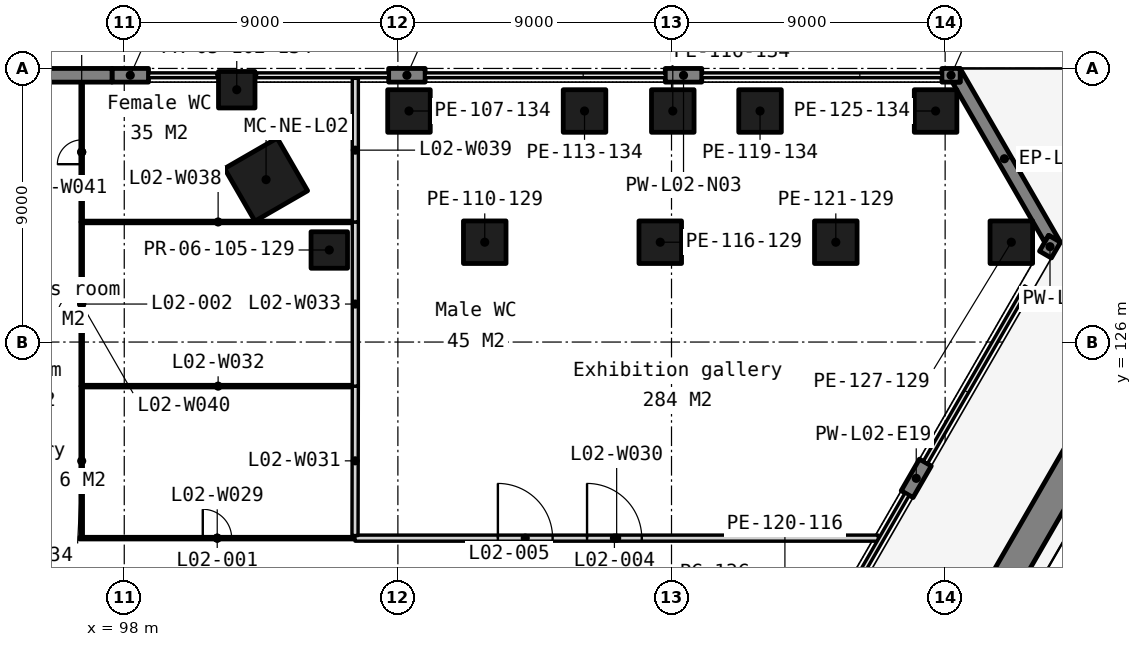
"""IFC4 building model, lengths in metres.
Left out: names, types, materials, properties, quantities, classifications, styles, units other than length and angle.
Written with IfcOpenShell. Run it as: python <this file> out.ifc"""

import sys

from ifc_helpers import new_model, si_unit, direction, frame, frame_2d, origin, origin_2d, place, context, subcontext, project, spatial, polyline, rectangle, outline, extrude, element, fill, save


model = new_model("IFC4")
c1 = context("Model", 3, precision=1e-05, world=origin(), true_north=direction((0.0, 1.0)))
c2 = subcontext(c1, "Body", "Model", "MODEL_VIEW")
j1 = project(units=[si_unit("LENGTHUNIT", "METRE"), si_unit("PLANEANGLEUNIT", "RADIAN")], contexts=[c1])
p1 = place(None, origin())
s1 = spatial("IfcSite", under=j1, at=p1, CompositionType="ELEMENT")
p2 = place(p1, origin())
s2 = spatial("IfcBuilding", under=s1, at=p2, CompositionType="ELEMENT")
p3 = place(p2, frame((0.0, 0.0, 13.5)))
s3 = spatial("IfcBuildingStorey", under=s2, at=p3, CompositionType="ELEMENT", Elevation=13.5)
for number, where, z_axis, x_axis in (
    (1, (107.365, 133.6, 0.0), (0.0, 0.0, 1.0), (1.0, 0.0, 0.0)),
    (2, (109.857, 129.284, 0.0), (0.0, 0.0, 1.0), (1.0, 0.0, 0.0)),
    (3, (113.139, 133.6, 0.0), (0.0, 0.0, 1.0), (1.0, 0.0, 0.0)),
    (4, (115.63, 129.284, 0.0), (0.0, 0.0, 1.0), (1.0, 0.0, 0.0)),
    (5, (116.042, 133.6, 0.0), (0.0, 0.0, 1.0), (1.0, 0.0, 0.0)),
    (6, (118.912, 133.6, 0.0), (0.0, 0.0, 1.0), (1.0, 0.0, 0.0)),
    (7, (121.404, 129.284, 0.0), (0.0, 0.0, 1.0), (1.0, 0.0, 0.0)),
    (8, (124.686, 133.6, 0.0), (0.0, 0.0, 1.0), (1.0, 0.0, 0.0)),
    (9, (127.177, 129.284, 0.0), (0.0, 0.0, 1.0), (1.0, 0.0, 0.0)),
):
    element("IfcColumn", number, at=place(p3, frame(where, z_axis=z_axis, x_axis=x_axis)), inside=s3, PredefinedType="COLUMN", context=c2, shape_type="SweptSolid", body=[
        extrude(rectangle(XDim=1.4, YDim=1.4, at=origin_2d()), origin(), (0.0, 0.0, 1.0), 6.0),
    ])
for number, where, z_axis, x_axis in (
    (10, (101.7, 134.3, 0.0), (0.0, 0.0, 1.0), (1.0, 0.0, 0.0)),
    (11, (104.744, 129.028, 0.0), (0.0, 0.0, 1.0), (1.0, 0.0, 0.0)),
):
    element("IfcColumn", number, at=place(p3, frame(where, z_axis=z_axis, x_axis=x_axis)), inside=s3, PredefinedType="COLUMN", context=c2, shape_type="SweptSolid", body=[
        extrude(rectangle(XDim=1.2, YDim=1.2, at=origin_2d()), origin(), (0.0, 0.0, 1.0), 6.0),
    ])
p4 = place(p3, frame((102.664, 131.342, 0.0), z_axis=(0.0, 0.0, 1.0), x_axis=(-0.5, 0.866025403784, 0.0)))
e12 = element("IfcColumn", 12, at=p4, inside=s3, PredefinedType="COLUMN", context=c2, shape_type="SweptSolid", body=[
    extrude(rectangle(XDim=2.0, YDim=2.0, at=origin_2d()), origin(), (0.0, 0.0, 1.0), 6.0),
])
p5 = place(p3, frame((0.0, 0.0, -0.3)))
e13 = element("IfcWall", 13, at=p5, inside=s3, PredefinedType="SOLIDWALL", context=c2, shape_type="SweptSolid", body=[
    extrude(outline(polyline([(128.794, 129.284), (128.404, 129.509), (128.274, 129.284), (125.234, 134.55), (125.494, 134.55), (125.494, 135.0), (128.794, 129.284)])), origin(), (0.0, 0.0, 1.0), 5.363),
])
p6 = place(p3, frame((125.494, 134.775, -0.3), z_axis=(0.0, 0.0, 1.0), x_axis=(-1.0, 0.0, 0.0)))
e14 = element("IfcWall", 14, at=p6, inside=s3, PredefinedType="SOLIDWALL", context=c2, shape_type="SweptSolid", body=[
    extrude(rectangle(XDim=0.6, YDim=0.45, at=frame_2d((0.3, 0.0))), origin(), (0.0, 0.0, 1.0), 5.363),
])
p7 = place(p3, frame((116.995, 134.775, -0.3), z_axis=(0.0, 0.0, 1.0), x_axis=(-1.0, 0.0, 0.0)))
e15 = element("IfcWall", 15, at=p7, inside=s3, PredefinedType="SOLIDWALL", context=c2, shape_type="SweptSolid", body=[
    extrude(rectangle(XDim=1.2, YDim=0.45, at=frame_2d((0.6, 0.0))), origin(), (0.0, 0.0, 1.0), 5.363),
])
p8 = place(p3, frame((107.896, 134.775, -0.3), z_axis=(0.0, 0.0, 1.0), x_axis=(-1.0, 0.0, 0.0)))
e16 = element("IfcWall", 16, at=p8, inside=s3, PredefinedType="SOLIDWALL", context=c2, shape_type="SweptSolid", body=[
    extrude(rectangle(XDim=1.2, YDim=0.45, at=frame_2d((0.6, 0.0))), origin(), (0.0, 0.0, 1.0), 5.363),
])
p9 = place(p3, frame((98.798, 134.775, -0.3), z_axis=(0.0, 0.0, 1.0), x_axis=(-1.0, 0.0, 0.0)))
e17 = element("IfcWall", 17, at=p9, inside=s3, PredefinedType="SOLIDWALL", context=c2, shape_type="SweptSolid", body=[
    extrude(rectangle(XDim=1.2, YDim=0.45, at=frame_2d((0.6, 0.0))), origin(), (0.0, 0.0, 1.0), 5.363),
])
p10 = place(p3, frame((97.598, 134.775, -0.3), z_axis=(0.0, 0.0, 1.0), x_axis=(-1.0, 0.0, 0.0)))
e18 = element("IfcWall", 18, at=p10, inside=s3, PredefinedType="SOLIDWALL", context=c2, shape_type="SweptSolid", body=[
    extrude(rectangle(XDim=7.899, YDim=0.45, at=frame_2d((3.949, 0.0))), origin(), (0.0, 0.0, 1.0), 5.363),
])
p11 = place(p3, frame((123.75, 120.997, -0.3), z_axis=(0.0, 0.0, 1.0), x_axis=(0.500033551112, 0.866006032174, 0.0)))
e19 = element("IfcWall", 19, at=p11, inside=s3, PredefinedType="SOLIDWALL", context=c2, shape_type="SweptSolid", body=[
    extrude(rectangle(XDim=1.2, YDim=0.45, at=frame_2d((0.6, 0.0))), origin(), (0.0, 0.0, 1.0), 5.363),
])
p12 = place(p3, frame((128.299, 128.877, -0.3), z_axis=(0.0, 0.0, 1.0), x_axis=(0.50012165622, 0.865955154139, 0.0)))
e20 = element("IfcWall", 20, at=p12, inside=s3, PredefinedType="SOLIDWALL", context=c2, shape_type="SweptSolid", body=[
    extrude(rectangle(XDim=0.6, YDim=0.45, at=frame_2d((0.3, 0.0))), origin(), (0.0, 0.0, 1.0), 5.363),
])
p13 = place(p3, frame((133.302, 129.091, 0.0), z_axis=(0.0, 0.0, 1.0), x_axis=(-0.500000924498, -0.866024870025, 0.0)))
e21 = element("IfcWall", 21, at=p13, inside=s3, PredefinedType="STANDARD", context=c2, shape_type="SweptSolid", body=[
    extrude(rectangle(XDim=100.935, YDim=1.0, at=frame_2d((50.467, 0.0))), origin(), (0.0, 0.0, 1.0), 0.6),
])
p14 = place(p3, frame((96.525, 119.55, 0.0), z_axis=(0.0, 0.0, 1.0), x_axis=(1.0, 0.0, 0.0)))
e22 = element("IfcWall", 22, at=p14, inside=s3, PredefinedType="PARTITIONING", context=c2, shape_type="SweptSolid", body=[
    extrude(rectangle(XDim=9.065, YDim=0.1, at=frame_2d((4.532, 0.0))), origin(), (0.0, 0.0, 1.0), 5.75),
])
p15 = place(p14, frame((4.057, 0.0, 0.0)))
e23 = element("IfcOpeningElement", 23, at=p15, cuts=e22, PredefinedType="OPENING", context=c2, shape_type="SweptSolid", body=[
    extrude(rectangle(XDim=0.95, YDim=2.1, at=frame_2d((0.475, 1.05))), frame((0.0, 0.06, 0.0), z_axis=(0.0, -1.0, 0.0), x_axis=(1.0, 0.0, 0.0)), (0.0, 0.0, 1.0), 0.12),
])
p16 = place(p3, frame((105.59, 119.55, 0.0), z_axis=(0.0, 0.0, 1.0), x_axis=(1.0, 0.0, 0.0)))
e24 = element("IfcWall", 24, at=p16, inside=s3, PredefinedType="PARTITIONING", context=c2, shape_type="SweptSolid", body=[
    extrude(rectangle(XDim=17.212, YDim=0.2, at=frame_2d((8.606, 0.0))), origin(), (0.0, 0.0, 1.0), 5.75),
])
p17 = place(p16, frame((7.632, 0.0, 0.0)))
e25 = element("IfcOpeningElement", 25, at=p17, cuts=e24, PredefinedType="OPENING", context=c2, shape_type="SweptSolid", body=[
    extrude(rectangle(XDim=1.8, YDim=2.1, at=frame_2d((0.9, 1.05))), frame((0.0, 0.11, 0.0), z_axis=(0.0, -1.0, 0.0), x_axis=(1.0, 0.0, 0.0)), (0.0, 0.0, 1.0), 0.22),
])
p18 = place(p16, frame((4.699, 0.0, 0.0)))
e26 = element("IfcOpeningElement", 26, at=p18, cuts=e24, PredefinedType="OPENING", context=c2, shape_type="SweptSolid", body=[
    extrude(rectangle(XDim=1.8, YDim=2.1, at=frame_2d((0.9, 1.05))), frame((0.0, 0.11, 0.0), z_axis=(0.0, -1.0, 0.0), x_axis=(1.0, 0.0, 0.0)), (0.0, 0.0, 1.0), 0.22),
])
p19 = place(p3, frame((105.59, 119.635, 0.0), z_axis=(0.0, 0.0, 1.0), x_axis=(0.002036554489, 0.999997926221, 0.0)))
e27 = element("IfcWall", 27, at=p19, inside=s3, PredefinedType="PARTITIONING", context=c2, shape_type="SweptSolid", body=[
    extrude(rectangle(XDim=4.915, YDim=0.2, at=frame_2d((2.458, 0.0))), origin(), (0.0, 0.0, 1.0), 5.75),
])
p20 = place(p3, frame((96.675, 124.55, 0.0), z_axis=(0.0, 0.0, 1.0), x_axis=(1.0, 0.0, 0.0)))
e28 = element("IfcWall", 28, at=p20, inside=s3, PredefinedType="PARTITIONING", context=c2, shape_type="SweptSolid", body=[
    extrude(rectangle(XDim=8.825, YDim=0.1, at=frame_2d((4.413, 0.0))), origin(), (0.0, 0.0, 1.0), 5.75),
])
p21 = place(p3, frame((105.6, 124.55, 0.0), z_axis=(0.0, 0.0, 1.0), x_axis=(0.0, 1.0, 0.0)))
e29 = element("IfcWall", 29, at=p21, inside=s3, PredefinedType="PARTITIONING", context=c2, shape_type="SweptSolid", body=[
    extrude(rectangle(XDim=5.4, YDim=0.2, at=frame_2d((2.7, 0.0))), origin(), (0.0, 0.0, 1.0), 5.75),
])
p22 = place(p3, frame((96.601, 119.625, 0.0), z_axis=(0.0, 0.0, 1.0), x_axis=(-9.9142418e-05, 0.999999995085, 0.0)))
e30 = element("IfcWall", 30, at=p22, inside=s3, PredefinedType="PARTITIONING", context=c2, shape_type="SweptSolid", body=[
    extrude(rectangle(XDim=4.925, YDim=0.1, at=frame_2d((2.462, 0.0))), origin(), (0.0, 0.0, 1.0), 5.75),
])
p23 = place(p3, frame((96.675, 129.95, 0.0), z_axis=(0.0, 0.0, 1.0), x_axis=(1.0, 0.0, 0.0)))
e31 = element("IfcWall", 31, at=p23, inside=s3, PredefinedType="PARTITIONING", context=c2, shape_type="SweptSolid", body=[
    extrude(rectangle(XDim=8.825, YDim=0.1, at=frame_2d((4.413, 0.0))), origin(), (0.0, 0.0, 1.0), 5.75),
])
p24 = place(p3, frame((105.6, 129.95, 0.0), z_axis=(0.0, 0.0, 1.0), x_axis=(0.0, 1.0, 0.0)))
e32 = element("IfcWall", 32, at=p24, inside=s3, PredefinedType="PARTITIONING", context=c2, shape_type="SweptSolid", body=[
    extrude(rectangle(XDim=4.725, YDim=0.2, at=frame_2d((2.363, 0.0))), origin(), (0.0, 0.0, 1.0), 5.75),
])
p25 = place(p3, frame((96.6, 124.55, 0.0), z_axis=(0.0, 0.0, 1.0), x_axis=(0.0, 1.0, 0.0)))
e33 = element("IfcWall", 33, at=p25, inside=s3, PredefinedType="PARTITIONING", context=c2, shape_type="SweptSolid", body=[
    extrude(rectangle(XDim=5.4, YDim=0.1, at=frame_2d((2.7, 0.0))), origin(), (0.0, 0.0, 1.0), 5.75),
])
p26 = place(p25, frame((2.3, 0.0, 0.0)))
e34 = element("IfcOpeningElement", 34, at=p26, cuts=e33, PredefinedType="OPENING", context=c2, shape_type="SweptSolid", body=[
    extrude(rectangle(XDim=0.8, YDim=2.1, at=frame_2d((0.4, 1.05))), frame((0.0, 0.06, 0.0), z_axis=(0.0, -1.0, 0.0), x_axis=(1.0, 0.0, 0.0)), (0.0, 0.0, 1.0), 0.12),
])
p27 = place(p3, frame((96.6, 129.95, 0.0), z_axis=(0.0, 0.0, 1.0), x_axis=(0.0, 1.0, 0.0)))
e35 = element("IfcWall", 35, at=p27, inside=s3, PredefinedType="PARTITIONING", context=c2, shape_type="SweptSolid", body=[
    extrude(rectangle(XDim=4.6, YDim=0.1, at=frame_2d((2.3, 0.0))), origin(), (0.0, 0.0, 1.0), 5.75),
])
p28 = place(p27, frame((1.9, 0.0, 0.0)))
e36 = element("IfcOpeningElement", 36, at=p28, cuts=e35, PredefinedType="OPENING", context=c2, shape_type="SweptSolid", body=[
    extrude(rectangle(XDim=0.8, YDim=2.1, at=frame_2d((0.4, 1.05))), frame((0.0, 0.06, 0.0), z_axis=(0.0, -1.0, 0.0), x_axis=(1.0, 0.0, 0.0)), (0.0, 0.0, 1.0), 0.12),
])
p29 = place(p15, origin())
e37 = element("IfcDoor", 37, at=p29, inside=s3, OperationType="SINGLE_SWING_LEFT", PredefinedType="DOOR", context=c2, shape_type="SweptSolid", body=[
    extrude(rectangle(XDim=0.95, YDim=2.1, at=frame_2d((0.475, 1.05))), frame((0.0, 0.025, 0.0), z_axis=(0.0, -1.0, 0.0), x_axis=(1.0, 0.0, 0.0)), (0.0, 0.0, 1.0), 0.05),
])
fill(e23, e37)
p30 = place(p26, origin())
e38 = element("IfcDoor", 38, at=p30, inside=s3, OperationType="SINGLE_SWING_LEFT", PredefinedType="DOOR", context=c2, shape_type="SweptSolid", body=[
    extrude(rectangle(XDim=0.8, YDim=2.1, at=frame_2d((0.4, 1.05))), frame((0.0, 0.025, 0.0), z_axis=(0.0, -1.0, 0.0), x_axis=(1.0, 0.0, 0.0)), (0.0, 0.0, 1.0), 0.05),
])
fill(e34, e38)
p31 = place(p28, origin())
e39 = element("IfcDoor", 39, at=p31, inside=s3, OperationType="SINGLE_SWING_LEFT", PredefinedType="DOOR", context=c2, shape_type="SweptSolid", body=[
    extrude(rectangle(XDim=0.8, YDim=2.1, at=frame_2d((0.4, 1.05))), frame((0.0, 0.025, 0.0), z_axis=(0.0, -1.0, 0.0), x_axis=(1.0, 0.0, 0.0)), (0.0, 0.0, 1.0), 0.05),
])
fill(e36, e39)
p32 = place(p17, origin())
e40 = element("IfcDoor", 40, at=p32, inside=s3, OperationType="SINGLE_SWING_LEFT", PredefinedType="DOOR", context=c2, shape_type="SweptSolid", body=[
    extrude(rectangle(XDim=1.8, YDim=2.1, at=frame_2d((0.9, 1.05))), frame((0.0, 0.025, 0.0), z_axis=(0.0, -1.0, 0.0), x_axis=(1.0, 0.0, 0.0)), (0.0, 0.0, 1.0), 0.05),
])
fill(e25, e40)
p33 = place(p18, origin())
e41 = element("IfcDoor", 41, at=p33, inside=s3, OperationType="SINGLE_SWING_LEFT", PredefinedType="DOOR", context=c2, shape_type="SweptSolid", body=[
    extrude(rectangle(XDim=1.8, YDim=2.1, at=frame_2d((0.9, 1.05))), frame((0.0, 0.025, 0.0), z_axis=(0.0, -1.0, 0.0), x_axis=(1.0, 0.0, 0.0)), (0.0, 0.0, 1.0), 0.05),
])
fill(e26, e41)
save(model, sys.argv[1])
